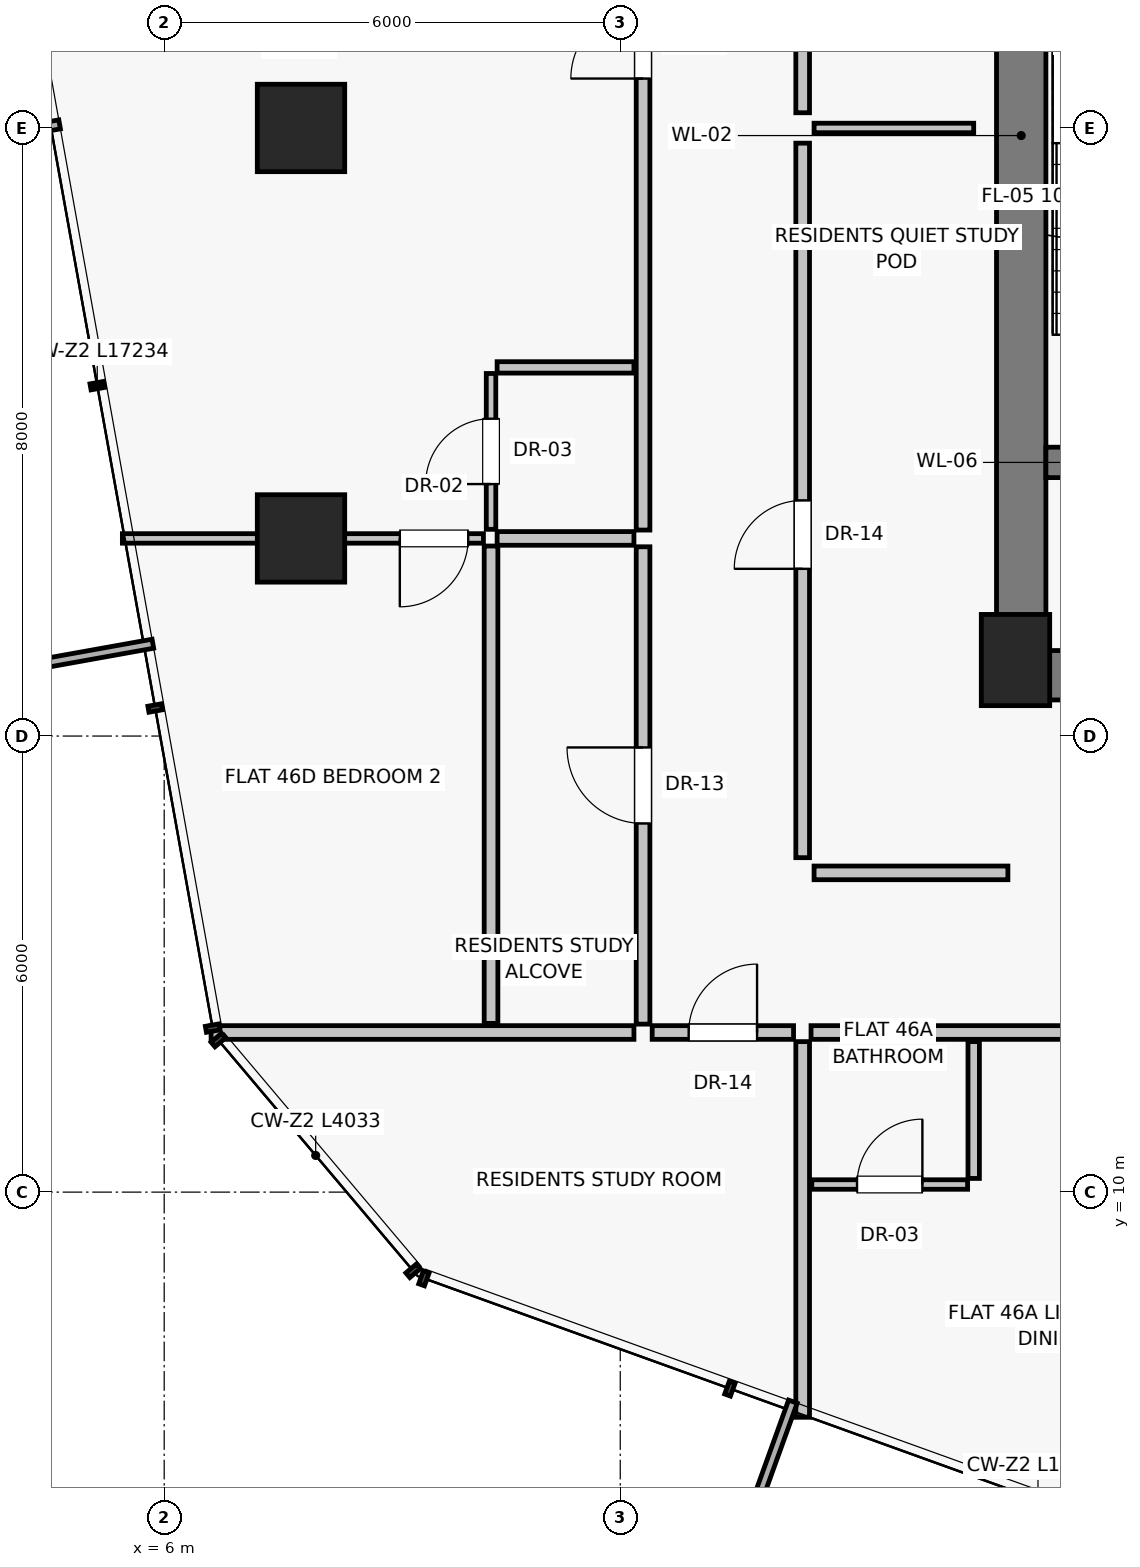
"""IFC4 building model, lengths in metres.
Left out: names, types, materials, properties, quantities, classifications, styles, units other than length and angle.
Written with IfcOpenShell. Run it as: python <this file> out.ifc"""

import sys

from ifc_helpers import new_model, si_unit, direction, frame, frame_2d, origin, origin_2d, place, context, subcontext, project, spatial, rectangle, extrude, source, transform, mapped, element, fill, save


model = new_model("IFC4")
c1 = context("Model", 3, precision=1e-05, world=origin(), true_north=direction((0.0, 1.0)))
c2 = subcontext(c1, "Body", "Model", "MODEL_VIEW")
j1 = project(units=[si_unit("LENGTHUNIT", "METRE"), si_unit("PLANEANGLEUNIT", "RADIAN")], contexts=[c1])
p1 = place(None, origin())
s1 = spatial("IfcSite", under=j1, at=p1, CompositionType="ELEMENT")
p2 = place(p1, origin())
s2 = spatial("IfcBuilding", under=s1, at=p2, CompositionType="ELEMENT")
p3 = place(p2, frame((0.0, 0.0, 163.05)))
s3 = spatial("IfcBuildingStorey", under=s2, at=p3, CompositionType="ELEMENT", Elevation=163.05)
p4 = place(p3, frame((17.2, 17.0, 0.0), z_axis=(0.0, 0.0, 1.0), x_axis=(1.0, 0.0, 0.0)))
e1 = element("IfcColumn", 1, at=p4, inside=s3, PredefinedType="PILASTER", context=c2, shape_type="SweptSolid", body=[
    extrude(rectangle(XDim=0.9, YDim=1.2, at=origin_2d()), origin(), (0.0, 0.0, 1.0), 3.25),
])
for number, where, z_axis, x_axis in (
    (2, (7.8, 24.0, 0.0), (0.0, 0.0, 1.0), (1.0, 0.0, 0.0)),
    (3, (7.8, 18.6, 0.0), (0.0, 0.0, 1.0), (1.0, 0.0, 0.0)),
):
    element("IfcColumn", number, at=place(p3, frame(where, z_axis=z_axis, x_axis=x_axis)), inside=s3, PredefinedType="COLUMN", context=c2, shape_type="SweptSolid", body=[
        extrude(rectangle(XDim=1.15, YDim=1.15, at=origin_2d()), origin(), (0.0, 0.0, 1.0), 3.25),
    ])
p5 = place(p3, frame((17.275, 16.8, 0.0), z_axis=(0.0, 0.0, 1.0), x_axis=(0.0, 1.0, 0.0)))
e4 = element("IfcWall", 4, at=p5, inside=s3, PredefinedType="SHEAR", context=c2, shape_type="SweptSolid", body=[
    extrude(rectangle(XDim=14.2, YDim=0.65, at=frame_2d((7.1, 0.0))), origin(), (0.0, 0.0, 1.0), 3.0),
])
p6 = place(p3, frame((17.2, 16.8, 0.0), z_axis=(0.0, 0.0, 1.0), x_axis=(1.0, 0.0, 0.0)))
e5 = element("IfcWall", 5, at=p6, inside=s3, PredefinedType="SHEAR", context=c2, shape_type="SweptSolid", body=[
    extrude(rectangle(XDim=5.85, YDim=0.65, at=frame_2d((2.925, 0.0))), origin(), (0.0, 0.0, 1.0), 3.0),
])
p7 = place(p6, frame((1.15, 0.0, 0.0)))
e6 = element("IfcOpeningElement", 6, at=p7, cuts=e5, PredefinedType="OPENING", context=c2, shape_type="SweptSolid", body=[
    extrude(rectangle(XDim=1.2, YDim=2.03, at=frame_2d((0.6, 1.015))), frame((0.0, 0.335, 0.0), z_axis=(0.0, -1.0, 0.0), x_axis=(1.0, 0.0, 0.0)), (0.0, 0.0, 1.0), 0.67),
])
p8 = place(p3, frame((17.6, 19.6, 0.0), z_axis=(0.0, 0.0, 1.0), x_axis=(1.0, 0.0, 0.0)))
e7 = element("IfcWall", 7, at=p8, inside=s3, PredefinedType="SHEAR", context=c2, shape_type="SweptSolid", body=[
    extrude(rectangle(XDim=3.4, YDim=0.4, at=frame_2d((1.7, 0.0))), origin(), (0.0, 0.0, 1.0), 3.0),
])
p9 = place(p8, frame((1.05, 0.0, 0.0)))
e8 = element("IfcOpeningElement", 8, at=p9, cuts=e7, PredefinedType="OPENING", context=c2, shape_type="SweptSolid", body=[
    extrude(rectangle(XDim=1.1, YDim=2.03, at=frame_2d((0.55, 1.015))), frame((0.0, 0.21, 0.0), z_axis=(0.0, -1.0, 0.0), x_axis=(1.0, 0.0, 0.0)), (0.0, 0.0, 1.0), 0.42),
])
p10 = place(p3, frame((14.4, 14.4, 0.0), z_axis=(0.0, 0.0, 1.0), x_axis=(0.0, 1.0, 0.0)))
e9 = element("IfcWall", 9, at=p10, inside=s3, PredefinedType="PARTITIONING", context=c2, shape_type="SweptSolid", body=[
    extrude(rectangle(XDim=9.4, YDim=0.18, at=frame_2d((4.7, 0.0))), origin(), (0.0, 0.0, 1.0), 3.0),
])
p11 = place(p10, frame((3.8, 0.0, 0.0)))
e10 = element("IfcOpeningElement", 10, at=p11, cuts=e9, PredefinedType="OPENING", context=c2, shape_type="SweptSolid", body=[
    extrude(rectangle(XDim=0.9, YDim=2.01, at=frame_2d((0.45, 1.005))), frame((0.0, 0.1, 0.0), z_axis=(0.0, -1.0, 0.0), x_axis=(1.0, 0.0, 0.0)), (0.0, 0.0, 1.0), 0.2),
])
p12 = place(p3, frame((14.4, 24.2, 0.0), z_axis=(0.0, 0.0, 1.0), x_axis=(0.0, 1.0, 0.0)))
e11 = element("IfcWall", 11, at=p12, inside=s3, PredefinedType="PARTITIONING", context=c2, shape_type="SweptSolid", body=[
    extrude(rectangle(XDim=9.2, YDim=0.18, at=frame_2d((4.6, 0.0))), origin(), (0.0, 0.0, 1.0), 3.0),
])
p13 = place(p12, frame((3.8, 0.0, 0.0)))
e12 = element("IfcOpeningElement", 12, at=p13, cuts=e11, PredefinedType="OPENING", context=c2, shape_type="SweptSolid", body=[
    extrude(rectangle(XDim=0.9, YDim=2.01, at=frame_2d((0.45, 1.005))), frame((0.0, 0.1, 0.0), z_axis=(0.0, -1.0, 0.0), x_axis=(1.0, 0.0, 0.0)), (0.0, 0.0, 1.0), 0.2),
])
p14 = place(p3, frame((14.55, 24.0, 0.0), z_axis=(0.0, 0.0, 1.0), x_axis=(1.0, 0.0, 0.0)))
e13 = element("IfcWall", 13, at=p14, inside=s3, PredefinedType="PARTITIONING", context=c2, shape_type="SweptSolid", body=[
    extrude(rectangle(XDim=2.1, YDim=0.125, at=frame_2d((1.05, 0.0))), origin(), (0.0, 0.0, 1.0), 3.0),
])
p15 = place(p3, frame((14.55, 14.2, 0.0), z_axis=(0.0, 0.0, 1.0), x_axis=(1.0, 0.0, 0.0)))
e14 = element("IfcWall", 14, at=p15, inside=s3, PredefinedType="PARTITIONING", context=c2, shape_type="SweptSolid", body=[
    extrude(rectangle(XDim=2.55, YDim=0.18, at=frame_2d((1.275, 0.0))), origin(), (0.0, 0.0, 1.0), 3.0),
])
p16 = place(p3, frame((14.4, 11.98, 0.0), z_axis=(0.0, 0.0, 1.0), x_axis=(0.0, -1.0, 0.0)))
e15 = element("IfcWall", 15, at=p16, inside=s3, PredefinedType="PARTITIONING", context=c2, shape_type="SweptSolid", body=[
    extrude(rectangle(XDim=4.942, YDim=0.18, at=frame_2d((2.471, 0.0))), origin(), (0.0, 0.0, 1.0), 3.0),
])
p17 = place(p3, frame((14.51, 12.1, 0.0), z_axis=(0.0, 0.0, 1.0), x_axis=(1.0, 0.0, 0.0)))
e16 = element("IfcWall", 16, at=p17, inside=s3, PredefinedType="PARTITIONING", context=c2, shape_type="SweptSolid", body=[
    extrude(rectangle(XDim=11.136, YDim=0.18, at=frame_2d((5.568, 0.0))), origin(), (0.0, 0.0, 1.0), 2.58),
])
p18 = place(p17, frame((3.663, 0.0, 0.0)))
e17 = element("IfcOpeningElement", 17, at=p18, cuts=e16, PredefinedType="OPENING", context=c2, shape_type="SweptSolid", body=[
    extrude(rectangle(XDim=0.95, YDim=2.02, at=frame_2d((0.475, 1.01))), frame((0.0, 0.1, 0.0), z_axis=(0.0, -1.0, 0.0), x_axis=(1.0, 0.0, 0.0)), (0.0, 0.0, 1.0), 0.2),
])
p19 = place(p3, frame((16.65, 11.98, 0.0), z_axis=(0.0, 0.0, 1.0), x_axis=(0.0, -1.0, 0.0)))
e18 = element("IfcWall", 18, at=p19, inside=s3, PredefinedType="PARTITIONING", context=c2, shape_type="SweptSolid", body=[
    extrude(rectangle(XDim=1.8, YDim=0.15, at=frame_2d((0.9, 0.0))), origin(), (0.0, 0.0, 1.0), 3.0),
])
p20 = place(p3, frame((14.52, 10.1, 0.0), z_axis=(0.0, 0.0, 1.0), x_axis=(1.0, 0.0, 0.0)))
e19 = element("IfcWall", 19, at=p20, inside=s3, PredefinedType="PARTITIONING", context=c2, shape_type="SweptSolid", body=[
    extrude(rectangle(XDim=2.05, YDim=0.125, at=frame_2d((1.025, 0.0))), origin(), (0.0, 0.0, 1.0), 3.0),
])
p21 = place(p20, frame((0.595, 0.0, 0.0)))
e20 = element("IfcOpeningElement", 20, at=p21, cuts=e19, PredefinedType="OPENING", context=c2, shape_type="SweptSolid", body=[
    extrude(rectangle(XDim=0.86, YDim=2.01, at=frame_2d((0.43, 1.005))), frame((0.0, 0.073, 0.0), z_axis=(0.0, -1.0, 0.0), x_axis=(1.0, 0.0, 0.0)), (0.0, 0.0, 1.0), 0.145),
])
p22 = place(p3, frame((12.18, 12.1, 0.0), z_axis=(0.0, 0.0, 1.0), x_axis=(-1.0, 0.0, 0.0)))
e21 = element("IfcWall", 21, at=p22, inside=s3, PredefinedType="PARTITIONING", context=c2, shape_type="SweptSolid", body=[
    extrude(rectangle(XDim=5.563, YDim=0.18, at=frame_2d((2.781, 0.0))), origin(), (0.0, 0.0, 1.0), 3.0),
])
p23 = place(p3, frame((12.3, 12.21, 0.0), z_axis=(0.0, 0.0, 1.0), x_axis=(0.0, 1.0, 0.0)))
e22 = element("IfcWall", 22, at=p23, inside=s3, PredefinedType="PARTITIONING", context=c2, shape_type="SweptSolid", body=[
    extrude(rectangle(XDim=6.28, YDim=0.18, at=frame_2d((3.14, 0.0))), origin(), (0.0, 0.0, 1.0), 2.58),
])
p24 = place(p23, frame((2.64, 0.0, 0.0)))
e23 = element("IfcOpeningElement", 23, at=p24, cuts=e22, PredefinedType="OPENING", context=c2, shape_type="SweptSolid", body=[
    extrude(rectangle(XDim=1.0, YDim=2.01, at=frame_2d((0.5, 1.005))), frame((0.0, 0.1, 0.0), z_axis=(0.0, -1.0, 0.0), x_axis=(1.0, 0.0, 0.0)), (0.0, 0.0, 1.0), 0.2),
])
p25 = place(p3, frame((12.3, 18.71, 0.0), z_axis=(0.0, 0.0, 1.0), x_axis=(0.0, 1.0, 0.0)))
e24 = element("IfcWall", 24, at=p25, inside=s3, PredefinedType="PARTITIONING", context=c2, shape_type="SweptSolid", body=[
    extrude(rectangle(XDim=16.88, YDim=0.18, at=frame_2d((8.44, 0.0))), origin(), (0.0, 0.0, 1.0), 2.58),
])
p26 = place(p25, frame((5.94, 0.0, 0.0)))
e25 = element("IfcOpeningElement", 25, at=p26, cuts=e24, PredefinedType="OPENING", context=c2, shape_type="SweptSolid", body=[
    extrude(rectangle(XDim=0.95, YDim=2.02, at=frame_2d((0.475, 1.01))), frame((0.0, 0.1, 0.0), z_axis=(0.0, -1.0, 0.0), x_axis=(1.0, 0.0, 0.0)), (0.0, 0.0, 1.0), 0.2),
])
p27 = place(p3, frame((10.3, 12.22, 0.0), z_axis=(0.0, 0.0, 1.0), x_axis=(0.0, 1.0, 0.0)))
e26 = element("IfcWall", 26, at=p27, inside=s3, PredefinedType="PARTITIONING", context=c2, shape_type="SweptSolid", body=[
    extrude(rectangle(XDim=6.28, YDim=0.18, at=frame_2d((3.14, 0.0))), origin(), (0.0, 0.0, 1.0), 3.0),
])
p28 = place(p3, frame((12.18, 18.6, 0.0), z_axis=(0.0, 0.0, 1.0), x_axis=(-1.0, 0.0, 0.0)))
e27 = element("IfcWall", 27, at=p28, inside=s3, PredefinedType="PARTITIONING", context=c2, shape_type="SweptSolid", body=[
    extrude(rectangle(XDim=1.8, YDim=0.18, at=frame_2d((0.9, 0.0))), origin(), (0.0, 0.0, 1.0), 2.378),
])
p29 = place(p3, frame((10.2, 18.6, 0.0), z_axis=(0.0, 0.0, 1.0), x_axis=(-1.0, 0.0, 0.0)))
e28 = element("IfcWall", 28, at=p29, inside=s3, PredefinedType="PARTITIONING", context=c2, shape_type="SweptSolid", body=[
    extrude(rectangle(XDim=4.75, YDim=0.125, at=frame_2d((2.375, 0.0))), origin(), (0.0, 0.0, 1.0), 2.378),
])
p30 = place(p29, frame((0.2, 0.0, 0.0)))
e29 = element("IfcOpeningElement", 29, at=p30, cuts=e28, PredefinedType="OPENING", context=c2, shape_type="SweptSolid", body=[
    extrude(rectangle(XDim=0.9, YDim=2.01, at=frame_2d((0.45, 1.005))), frame((0.0, 0.073, 0.0), z_axis=(0.0, -1.0, 0.0), x_axis=(1.0, 0.0, 0.0)), (0.0, 0.0, 1.0), 0.145),
])
p31 = place(p3, frame((12.18, 20.85, 0.0), z_axis=(0.0, 0.0, 1.0), x_axis=(-1.0, 0.0, 0.0)))
e30 = element("IfcWall", 30, at=p31, inside=s3, PredefinedType="PARTITIONING", context=c2, shape_type="SweptSolid", body=[
    extrude(rectangle(XDim=1.8, YDim=0.15, at=frame_2d((0.9, 0.0))), origin(), (0.0, 0.0, 1.0), 3.0),
])
p32 = place(p3, frame((10.3, 18.72, 0.0), z_axis=(0.0, 0.0, 1.0), x_axis=(0.0, 1.0, 0.0)))
e31 = element("IfcWall", 31, at=p32, inside=s3, PredefinedType="PARTITIONING", context=c2, shape_type="SweptSolid", body=[
    extrude(rectangle(XDim=2.05, YDim=0.125, at=frame_2d((1.025, 0.0))), origin(), (0.0, 0.0, 1.0), 3.0),
])
p33 = place(p32, frame((0.595, 0.0, 0.0)))
e32 = element("IfcOpeningElement", 32, at=p33, cuts=e31, PredefinedType="OPENING", context=c2, shape_type="SweptSolid", body=[
    extrude(rectangle(XDim=0.86, YDim=2.01, at=frame_2d((0.43, 1.005))), frame((0.0, 0.073, 0.0), z_axis=(0.0, -1.0, 0.0), x_axis=(1.0, 0.0, 0.0)), (0.0, 0.0, 1.0), 0.145),
])
p34 = place(p3, frame((12.42, 12.1, 0.0), z_axis=(0.0, 0.0, 1.0), x_axis=(1.0, 0.0, 0.0)))
e33 = element("IfcWall", 33, at=p34, inside=s3, PredefinedType="PARTITIONING", context=c2, shape_type="SweptSolid", body=[
    extrude(rectangle(XDim=1.86, YDim=0.18, at=frame_2d((0.93, 0.0))), origin(), (0.0, 0.0, 1.0), 3.0),
])
p35 = place(p34, frame((0.48, 0.0, 0.0)))
e34 = element("IfcOpeningElement", 34, at=p35, cuts=e33, PredefinedType="OPENING", context=c2, shape_type="SweptSolid", body=[
    extrude(rectangle(XDim=0.9, YDim=2.01, at=frame_2d((0.45, 1.005))), frame((0.0, 0.1, 0.0), z_axis=(0.0, -1.0, 0.0), x_axis=(1.0, 0.0, 0.0)), (0.0, 0.0, 1.0), 0.2),
])
m1 = source(origin(), c2, "Body", "SweptSolid", [
    extrude(rectangle(XDim=0.9, YDim=2.01, at=frame_2d((0.45, 1.005))), frame((0.0, 0.025, 0.0), z_axis=(0.0, -1.0, 0.0), x_axis=(1.0, 0.0, 0.0)), (0.0, 0.0, 1.0), 0.05),
])
p36 = place(p11, origin())
e35 = element("IfcDoor", 35, at=p36, inside=s3, OperationType="SINGLE_SWING_LEFT", PredefinedType="DOOR", context=c2, shape_type="MappedRepresentation", body=[
    mapped(m1, transform((0.0, 0.0, 0.0), scale=1.0)),
])
fill(e10, e35)
m2 = source(origin(), c2, "Body", "SweptSolid", [
    extrude(rectangle(XDim=0.86, YDim=2.01, at=frame_2d((0.43, 1.005))), frame((0.0, 0.025, 0.0), z_axis=(0.0, -1.0, 0.0), x_axis=(1.0, 0.0, 0.0)), (0.0, 0.0, 1.0), 0.05),
])
p37 = place(p21, origin())
e36 = element("IfcDoor", 36, at=p37, inside=s3, OperationType="SINGLE_SWING_RIGHT", PredefinedType="DOOR", context=c2, shape_type="MappedRepresentation", body=[
    mapped(m2, transform((0.0, 0.0, 0.0), scale=1.0)),
])
fill(e20, e36)
m3 = source(origin(), c2, "Body", "SweptSolid", [
    extrude(rectangle(XDim=1.0, YDim=2.01, at=frame_2d((0.5, 1.005))), frame((0.0, 0.025, 0.0), z_axis=(0.0, -1.0, 0.0), x_axis=(1.0, 0.0, 0.0)), (0.0, 0.0, 1.0), 0.05),
])
p38 = place(p24, origin())
e37 = element("IfcDoor", 37, at=p38, inside=s3, OperationType="SINGLE_SWING_RIGHT", PredefinedType="DOOR", context=c2, shape_type="MappedRepresentation", body=[
    mapped(m3, transform((0.0, 0.0, 0.0), scale=1.0)),
])
fill(e23, e37)
m4 = source(origin(), c2, "Body", "SweptSolid", [
    extrude(rectangle(XDim=0.95, YDim=2.02, at=frame_2d((0.475, 1.01))), frame((0.0, 0.025, 0.0), z_axis=(0.0, -1.0, 0.0), x_axis=(1.0, 0.0, 0.0)), (0.0, 0.0, 1.0), 0.05),
])
p39 = place(p26, origin())
e38 = element("IfcDoor", 38, at=p39, inside=s3, OperationType="SINGLE_SWING_LEFT", PredefinedType="DOOR", context=c2, shape_type="MappedRepresentation", body=[
    mapped(m4, transform((0.0, 0.0, 0.0), scale=1.0)),
])
fill(e25, e38)
p40 = place(p30, origin())
e39 = element("IfcDoor", 39, at=p40, inside=s3, OperationType="SINGLE_SWING_RIGHT", PredefinedType="DOOR", context=c2, shape_type="MappedRepresentation", body=[
    mapped(m1, transform((0.0, 0.0, 0.0), scale=1.0)),
])
fill(e29, e39)
p41 = place(p33, origin())
e40 = element("IfcDoor", 40, at=p41, inside=s3, OperationType="SINGLE_SWING_LEFT", PredefinedType="DOOR", context=c2, shape_type="MappedRepresentation", body=[
    mapped(m2, transform((0.0, 0.0, 0.0), scale=1.0)),
])
fill(e32, e40)
p42 = place(p35, origin())
e41 = element("IfcDoor", 41, at=p42, inside=s3, OperationType="SINGLE_SWING_RIGHT", PredefinedType="DOOR", context=c2, shape_type="MappedRepresentation", body=[
    mapped(m1, transform((0.0, 0.0, 0.0), scale=1.0)),
])
fill(e34, e41)
save(model, sys.argv[1])
